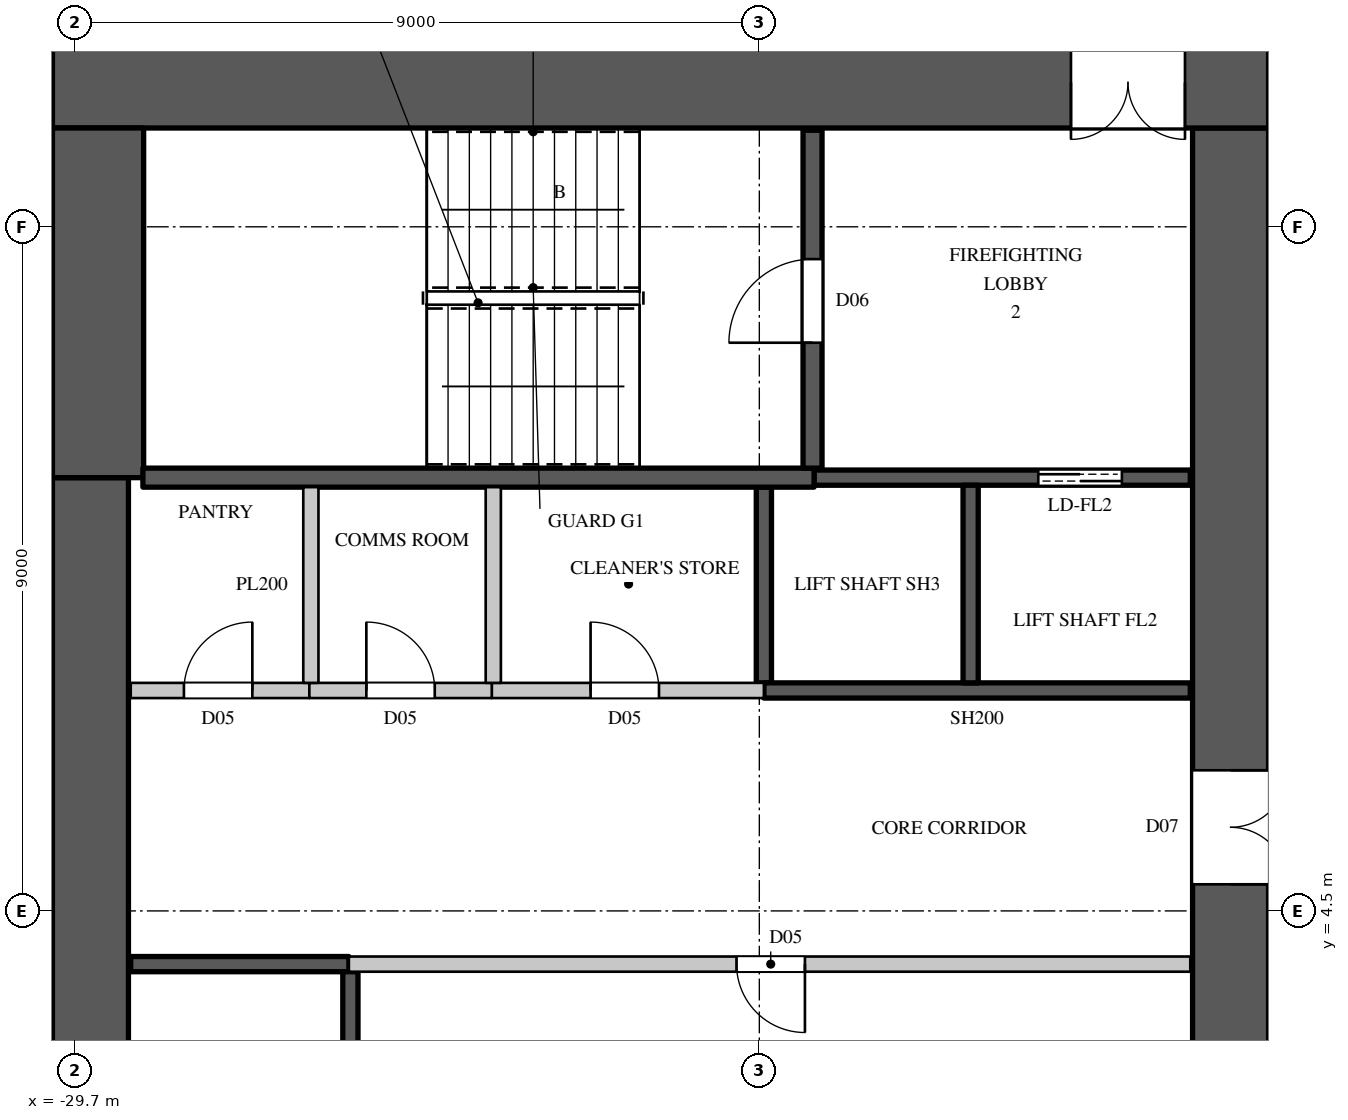
"""IFC4 building model, lengths in metres.
Left out: names, types, materials, properties, quantities, classifications, styles, units other than length and angle.
Written with IfcOpenShell. Run it as: python <this file> out.ifc"""

import sys

from ifc_helpers import new_model, si_unit, direction, frame, frame_2d, origin, place, context, subcontext, project, spatial, rectangle, extrude, element, fill, save


model = new_model("IFC4")
c1 = context("Model", 3, precision=1e-05, world=origin(), true_north=direction((0.0, 1.0)))
c2 = subcontext(c1, "Body", "Model", "MODEL_VIEW")
j1 = project(units=[si_unit("LENGTHUNIT", "METRE"), si_unit("PLANEANGLEUNIT", "RADIAN")], contexts=[c1])
p1 = place(None, origin())
s1 = spatial("IfcSite", under=j1, at=p1, CompositionType="ELEMENT")
p2 = place(p1, origin())
s2 = spatial("IfcBuilding", under=s1, at=p2, CompositionType="ELEMENT")
p3 = place(p2, frame((0.0, 0.0, 113.1)))
s3 = spatial("IfcBuildingStorey", under=s2, at=p3, CompositionType="ELEMENT", Elevation=113.1)
p4 = place(p3, frame((-30.0, 15.4, 0.0), z_axis=(0.0, 0.0, 1.0), x_axis=(1.0, 0.0, 0.0)))
e1 = element("IfcWall", 1, at=p4, inside=s3, PredefinedType="SHEAR", context=c2, shape_type="SweptSolid", body=[
    extrude(rectangle(XDim=16.0, YDim=1.2, at=frame_2d((8.0, 0.0))), origin(), (0.0, 0.0, 1.0), 3.6),
])
p5 = place(p4, frame((13.4, 0.0, 0.0)))
e2 = element("IfcOpeningElement", 2, at=p5, cuts=e1, PredefinedType="OPENING", context=c2, shape_type="SweptSolid", body=[
    extrude(rectangle(XDim=1.5, YDim=2.4, at=frame_2d((0.75, 1.2))), frame((0.0, 0.61, 0.0), z_axis=(0.0, -1.0, 0.0), x_axis=(1.0, 0.0, 0.0)), (0.0, 0.0, 1.0), 1.22),
])
p6 = place(p3, frame((-14.5, -14.8, 0.0), z_axis=(0.0, 0.0, 1.0), x_axis=(0.0, 1.0, 0.0)))
e3 = element("IfcWall", 3, at=p6, inside=s3, PredefinedType="SHEAR", context=c2, shape_type="SweptSolid", body=[
    extrude(rectangle(XDim=29.6, YDim=1.0, at=frame_2d((14.8, 0.0))), origin(), (0.0, 0.0, 1.0), 3.6),
])
p7 = place(p6, frame((8.45, 0.0, 0.0)))
e4 = element("IfcOpeningElement", 4, at=p7, cuts=e3, PredefinedType="OPENING", context=c2, shape_type="SweptSolid", body=[
    extrude(rectangle(XDim=1.5, YDim=2.4, at=frame_2d((0.75, 1.2))), frame((0.0, 0.51, 0.0), z_axis=(0.0, -1.0, 0.0), x_axis=(1.0, 0.0, 0.0)), (0.0, 0.0, 1.0), 1.02),
])
p8 = place(p6, frame((19.65, 0.0, 0.0)))
e5 = element("IfcOpeningElement", 5, at=p8, cuts=e3, PredefinedType="OPENING", context=c2, shape_type="SweptSolid", body=[
    extrude(rectangle(XDim=1.5, YDim=2.4, at=frame_2d((0.75, 1.2))), frame((0.0, 0.51, 0.0), z_axis=(0.0, -1.0, 0.0), x_axis=(1.0, 0.0, 0.0)), (0.0, 0.0, 1.0), 1.02),
])
p9 = place(p6, frame((14.5, 0.0, 0.0)))
e6 = element("IfcOpeningElement", 6, at=p9, cuts=e3, PredefinedType="OPENING", context=c2, shape_type="SweptSolid", body=[
    extrude(rectangle(XDim=0.6, YDim=2.0, at=frame_2d((0.3, 1.0))), frame((0.0, 0.51, 0.0), z_axis=(0.0, -1.0, 0.0), x_axis=(1.0, 0.0, 0.0)), (0.0, 0.0, 1.0), 1.02),
])
p10 = place(p3, frame((-29.5, -10.2, 0.0), z_axis=(0.0, 0.0, 1.0), x_axis=(0.0, 1.0, 0.0)))
e7 = element("IfcWall", 7, at=p10, inside=s3, PredefinedType="SHEAR", context=c2, shape_type="SweptSolid", body=[
    extrude(rectangle(XDim=20.4, YDim=1.0, at=frame_2d((10.2, 0.0))), origin(), (0.0, 0.0, 1.0), 3.6),
])
p11 = place(p3, frame((-29.4, 10.2, 0.0), z_axis=(0.0, 0.0, 1.0), x_axis=(0.0, 1.0, 0.0)))
e8 = element("IfcWall", 8, at=p11, inside=s3, PredefinedType="SHEAR", context=c2, shape_type="SweptSolid", body=[
    extrude(rectangle(XDim=4.6, YDim=1.2, at=frame_2d((2.3, 0.0))), origin(), (0.0, 0.0, 1.0), 3.6),
])
p12 = place(p3, frame((-28.97, 7.4, 0.0), z_axis=(0.0, 0.0, 1.0), x_axis=(1.0, 0.0, 0.0)))
e9 = element("IfcWall", 9, at=p12, inside=s3, PredefinedType="PARTITIONING", context=c2, shape_type="SweptSolid", body=[
    extrude(rectangle(XDim=2.35, YDim=0.2, at=frame_2d((1.175, 0.0))), origin(), (0.0, 0.0, 1.0), 3.3),
])
p13 = place(p12, frame((0.7, 0.0, 0.0)))
e10 = element("IfcOpeningElement", 10, at=p13, cuts=e9, PredefinedType="OPENING", context=c2, shape_type="SweptSolid", body=[
    extrude(rectangle(XDim=0.9, YDim=2.2, at=frame_2d((0.45, 1.1))), frame((0.0, 0.11, 0.0), z_axis=(0.0, -1.0, 0.0), x_axis=(1.0, 0.0, 0.0)), (0.0, 0.0, 1.0), 0.22),
])
p14 = place(p3, frame((-26.1, 3.8, 0.0), z_axis=(0.0, 0.0, 1.0), x_axis=(1.0, 0.0, 0.0)))
e11 = element("IfcWall", 11, at=p14, inside=s3, PredefinedType="PARTITIONING", context=c2, shape_type="SweptSolid", body=[
    extrude(rectangle(XDim=11.07, YDim=0.2, at=frame_2d((5.535, 0.0))), origin(), (0.0, 0.0, 1.0), 3.3),
])
p15 = place(p14, frame((5.1, 0.0, 0.0)))
e12 = element("IfcOpeningElement", 12, at=p15, cuts=e11, PredefinedType="OPENING", context=c2, shape_type="SweptSolid", body=[
    extrude(rectangle(XDim=0.9, YDim=2.2, at=frame_2d((0.45, 1.1))), frame((0.0, 0.11, 0.0), z_axis=(0.0, -1.0, 0.0), x_axis=(1.0, 0.0, 0.0)), (0.0, 0.0, 1.0), 0.22),
])
p16 = place(p3, frame((-24.22, 7.4, 0.0), z_axis=(0.0, 0.0, 1.0), x_axis=(1.0, 0.0, 0.0)))
e13 = element("IfcWall", 13, at=p16, inside=s3, PredefinedType="PARTITIONING", context=c2, shape_type="SweptSolid", body=[
    extrude(rectangle(XDim=3.58, YDim=0.2, at=frame_2d((1.79, 0.0))), origin(), (0.0, 0.0, 1.0), 3.3),
])
p17 = place(p16, frame((1.3, 0.0, 0.0)))
e14 = element("IfcOpeningElement", 14, at=p17, cuts=e13, PredefinedType="OPENING", context=c2, shape_type="SweptSolid", body=[
    extrude(rectangle(XDim=0.9, YDim=2.2, at=frame_2d((0.45, 1.1))), frame((0.0, 0.11, 0.0), z_axis=(0.0, -1.0, 0.0), x_axis=(1.0, 0.0, 0.0)), (0.0, 0.0, 1.0), 0.22),
])
p18 = place(p3, frame((-26.62, 7.4, 0.0), z_axis=(0.0, 0.0, 1.0), x_axis=(1.0, 0.0, 0.0)))
e15 = element("IfcWall", 15, at=p18, inside=s3, PredefinedType="PARTITIONING", context=c2, shape_type="SweptSolid", body=[
    extrude(rectangle(XDim=2.4, YDim=0.2, at=frame_2d((1.2, 0.0))), origin(), (0.0, 0.0, 1.0), 3.3),
])
p19 = place(p18, frame((0.75, 0.0, 0.0)))
e16 = element("IfcOpeningElement", 16, at=p19, cuts=e15, PredefinedType="OPENING", context=c2, shape_type="SweptSolid", body=[
    extrude(rectangle(XDim=0.9, YDim=2.2, at=frame_2d((0.45, 1.1))), frame((0.0, 0.11, 0.0), z_axis=(0.0, -1.0, 0.0), x_axis=(1.0, 0.0, 0.0)), (0.0, 0.0, 1.0), 0.22),
])
for number, where, z_axis, x_axis in (
    (17, (-26.6, 7.5, 0.0), (0.0, 0.0, 1.0), (0.0, 1.0, 0.0)),
    (18, (-24.2, 7.5, 0.0), (0.0, 0.0, 1.0), (0.0, 1.0, 0.0)),
):
    element("IfcWall", number, at=place(p3, frame(where, z_axis=z_axis, x_axis=x_axis)), inside=s3, PredefinedType="PARTITIONING", context=c2, shape_type="SweptSolid", body=[
        extrude(rectangle(XDim=2.575, YDim=0.2, at=frame_2d((1.288, 0.0))), origin(), (0.0, 0.0, 1.0), 3.3),
    ])
p20 = place(p3, frame((-28.97, 3.8, 0.0), z_axis=(0.0, 0.0, 1.0), x_axis=(1.0, 0.0, 0.0)))
e19 = element("IfcWall", 19, at=p20, inside=s3, PredefinedType="SHEAR", context=c2, shape_type="SweptSolid", body=[
    extrude(rectangle(XDim=2.87, YDim=0.2, at=frame_2d((1.435, 0.0))), origin(), (0.0, 0.0, 1.0), 3.3),
])
p21 = place(p3, frame((-26.08, 1.1, 0.0), z_axis=(0.0, 0.0, 1.0), x_axis=(0.0, 1.0, 0.0)))
e20 = element("IfcWall", 20, at=p21, inside=s3, PredefinedType="SHEAR", context=c2, shape_type="SweptSolid", body=[
    extrude(rectangle(XDim=2.6, YDim=0.2, at=frame_2d((1.3, 0.0))), origin(), (0.0, 0.0, 1.0), 3.3),
])
p22 = place(p3, frame((-20.64, 7.5, 0.0), z_axis=(0.0, 0.0, 1.0), x_axis=(0.0, 1.0, 0.0)))
e21 = element("IfcWall", 21, at=p22, inside=s3, PredefinedType="SHEAR", context=c2, shape_type="SweptSolid", body=[
    extrude(rectangle(XDim=2.575, YDim=0.2, at=frame_2d((1.288, 0.0))), origin(), (0.0, 0.0, 1.0), 3.3),
])
p23 = place(p3, frame((-20.64, 7.4, 0.0), z_axis=(0.0, 0.0, 1.0), x_axis=(1.0, 0.0, 0.0)))
e22 = element("IfcWall", 22, at=p23, inside=s3, PredefinedType="SHEAR", context=c2, shape_type="SweptSolid", body=[
    extrude(rectangle(XDim=5.61, YDim=0.2, at=frame_2d((2.805, 0.0))), origin(), (0.0, 0.0, 1.0), 3.3),
])
p24 = place(p3, frame((-19.98, 10.2, 0.0), z_axis=(0.0, 0.0, 1.0), x_axis=(1.0, 0.0, 0.0)))
e23 = element("IfcWall", 23, at=p24, inside=s3, PredefinedType="SHEAR", context=c2, shape_type="SweptSolid", body=[
    extrude(rectangle(XDim=4.95, YDim=0.2, at=frame_2d((2.475, 0.0))), origin(), (0.0, 0.0, 1.0), 3.3),
])
p25 = place(p24, frame((2.95, 0.0, 0.0)))
e24 = element("IfcOpeningElement", 24, at=p25, cuts=e23, PredefinedType="OPENING", context=c2, shape_type="SweptSolid", body=[
    extrude(rectangle(XDim=1.1, YDim=2.2, at=frame_2d((0.55, 1.1))), frame((0.0, 0.11, 0.0), z_axis=(0.0, -1.0, 0.0), x_axis=(1.0, 0.0, 0.0)), (0.0, 0.0, 1.0), 0.22),
])
p26 = place(p3, frame((-17.92, 7.5, 0.0), z_axis=(0.0, 0.0, 1.0), x_axis=(0.0, 1.0, 0.0)))
e25 = element("IfcWall", 25, at=p26, inside=s3, PredefinedType="SHEAR", context=c2, shape_type="SweptSolid", body=[
    extrude(rectangle(XDim=2.6, YDim=0.2, at=frame_2d((1.3, 0.0))), origin(), (0.0, 0.0, 1.0), 3.6),
])
p27 = place(p3, frame((-28.81, 10.2, 0.0), z_axis=(0.0, 0.0, 1.0), x_axis=(1.0, 0.0, 0.0)))
e26 = element("IfcWall", 26, at=p27, inside=s3, PredefinedType="SHEAR", context=c2, shape_type="SweptSolid", body=[
    extrude(rectangle(XDim=8.83, YDim=0.25, at=frame_2d((4.415, 0.0))), origin(), (0.0, 0.0, 1.0), 3.3),
])
p28 = place(p3, frame((-20.0, 10.325, 0.0), z_axis=(0.0, 0.0, 1.0), x_axis=(0.0, 1.0, 0.0)))
e27 = element("IfcWall", 27, at=p28, inside=s3, PredefinedType="SHEAR", context=c2, shape_type="SweptSolid", body=[
    extrude(rectangle(XDim=4.445, YDim=0.25, at=frame_2d((2.223, 0.0))), origin(), (0.0, 0.0, 1.0), 3.3),
])
p29 = place(p28, frame((1.65, 0.0, 0.0)))
e28 = element("IfcOpeningElement", 28, at=p29, cuts=e27, PredefinedType="OPENING", context=c2, shape_type="SweptSolid", body=[
    extrude(rectangle(XDim=1.1, YDim=2.2, at=frame_2d((0.55, 1.1))), frame((0.0, 0.135, 0.0), z_axis=(0.0, -1.0, 0.0), x_axis=(1.0, 0.0, 0.0)), (0.0, 0.0, 1.0), 0.27),
])
p30 = place(p29, origin())
e29 = element("IfcDoor", 29, at=p30, inside=s3, OperationType="SINGLE_SWING_LEFT", PredefinedType="DOOR", context=c2, shape_type="SweptSolid", body=[
    extrude(rectangle(XDim=1.1, YDim=2.2, at=frame_2d((0.55, 1.1))), frame((0.0, 0.025, 0.0), z_axis=(0.0, -1.0, 0.0), x_axis=(1.0, 0.0, 0.0)), (0.0, 0.0, 1.0), 0.05),
])
fill(e28, e29)
p31 = place(p15, origin())
e30 = element("IfcDoor", 30, at=p31, inside=s3, OperationType="SINGLE_SWING_LEFT", PredefinedType="DOOR", context=c2, shape_type="SweptSolid", body=[
    extrude(rectangle(XDim=0.9, YDim=2.2, at=frame_2d((0.45, 1.1))), frame((0.0, 0.025, 0.0), z_axis=(0.0, -1.0, 0.0), x_axis=(1.0, 0.0, 0.0)), (0.0, 0.0, 1.0), 0.05),
])
fill(e12, e30)
p32 = place(p13, origin())
e31 = element("IfcDoor", 31, at=p32, inside=s3, OperationType="SINGLE_SWING_RIGHT", PredefinedType="DOOR", context=c2, shape_type="SweptSolid", body=[
    extrude(rectangle(XDim=0.9, YDim=2.2, at=frame_2d((0.45, 1.1))), frame((0.0, 0.025, 0.0), z_axis=(0.0, -1.0, 0.0), x_axis=(1.0, 0.0, 0.0)), (0.0, 0.0, 1.0), 0.05),
])
fill(e10, e31)
p33 = place(p19, origin())
e32 = element("IfcDoor", 32, at=p33, inside=s3, OperationType="SINGLE_SWING_LEFT", PredefinedType="DOOR", context=c2, shape_type="SweptSolid", body=[
    extrude(rectangle(XDim=0.9, YDim=2.2, at=frame_2d((0.45, 1.1))), frame((0.0, 0.025, 0.0), z_axis=(0.0, -1.0, 0.0), x_axis=(1.0, 0.0, 0.0)), (0.0, 0.0, 1.0), 0.05),
])
fill(e16, e32)
p34 = place(p17, origin())
e33 = element("IfcDoor", 33, at=p34, inside=s3, OperationType="SINGLE_SWING_LEFT", PredefinedType="DOOR", context=c2, shape_type="SweptSolid", body=[
    extrude(rectangle(XDim=0.9, YDim=2.2, at=frame_2d((0.45, 1.1))), frame((0.0, 0.025, 0.0), z_axis=(0.0, -1.0, 0.0), x_axis=(1.0, 0.0, 0.0)), (0.0, 0.0, 1.0), 0.05),
])
fill(e14, e33)
p35 = place(p25, origin())
e34 = element("IfcDoor", 34, at=p35, inside=s3, OperationType="DOUBLE_DOOR_SLIDING", PredefinedType="DOOR", context=c2, shape_type="SweptSolid", body=[
    extrude(rectangle(XDim=1.1, YDim=2.2, at=frame_2d((0.55, 1.1))), frame((0.0, 0.025, 0.0), z_axis=(0.0, -1.0, 0.0), x_axis=(1.0, 0.0, 0.0)), (0.0, 0.0, 1.0), 0.05),
])
fill(e24, e34)
p36 = place(p5, origin())
e35 = element("IfcDoor", 35, at=p36, inside=s3, OperationType="DOUBLE_DOOR_SINGLE_SWING", PredefinedType="DOOR", context=c2, shape_type="SweptSolid", body=[
    extrude(rectangle(XDim=1.5, YDim=2.4, at=frame_2d((0.75, 1.2))), frame((0.0, 0.025, 0.0), z_axis=(0.0, -1.0, 0.0), x_axis=(1.0, 0.0, 0.0)), (0.0, 0.0, 1.0), 0.05),
])
fill(e2, e35)
p37 = place(p8, origin())
e36 = element("IfcDoor", 36, at=p37, inside=s3, OperationType="DOUBLE_DOOR_SINGLE_SWING", PredefinedType="DOOR", context=c2, shape_type="SweptSolid", body=[
    extrude(rectangle(XDim=1.5, YDim=2.4, at=frame_2d((0.75, 1.2))), frame((0.0, -0.445, 0.0), z_axis=(0.0, -1.0, 0.0), x_axis=(1.0, 0.0, 0.0)), (0.0, 0.0, 1.0), 0.05),
])
fill(e5, e36)
save(model, sys.argv[1])
